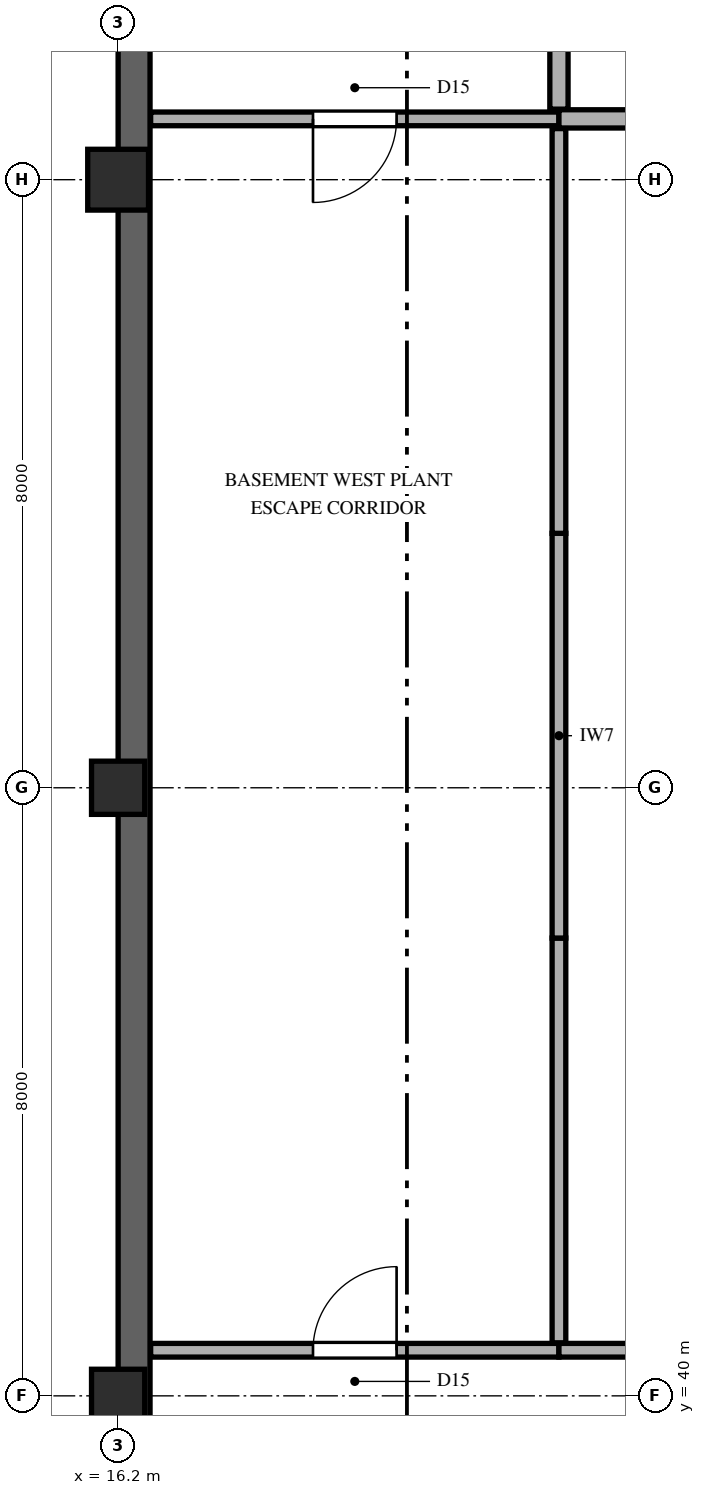
"""IFC4 building model, lengths in metres.
Left out: names, types, materials, properties, quantities, classifications, styles, units other than length and angle.
Written with IfcOpenShell. Run it as: python <this file> out.ifc"""

import sys

from ifc_helpers import new_model, si_unit, direction, frame, frame_2d, origin, origin_2d, place, context, subcontext, project, spatial, rectangle, extrude, element, fill, save


model = new_model("IFC4")
c1 = context("Model", 3, precision=1e-05, world=origin(), true_north=direction((0.0, 1.0)))
c2 = subcontext(c1, "Body", "Model", "MODEL_VIEW")
j1 = project(units=[si_unit("LENGTHUNIT", "METRE"), si_unit("PLANEANGLEUNIT", "RADIAN")], contexts=[c1])
p1 = place(None, origin())
s1 = spatial("IfcSite", under=j1, at=p1, CompositionType="ELEMENT")
p2 = place(p1, origin())
s2 = spatial("IfcBuilding", under=s1, at=p2, CompositionType="ELEMENT")
p3 = place(p2, frame((0.0, 0.0, -4.8)))
s3 = spatial("IfcBuildingStorey", under=s2, at=p3, CompositionType="ELEMENT", Elevation=-4.8)
p4 = place(p3, frame((16.41, 24.21, 0.0), z_axis=(0.0, 0.0, 1.0), x_axis=(0.0, 1.0, 0.0)))
e1 = element("IfcWall", 1, at=p4, inside=s3, PredefinedType="USERDEFINED", context=c2, shape_type="SweptSolid", body=[
    extrude(rectangle(XDim=87.58, YDim=0.42, at=frame_2d((43.79, 0.0))), origin(), (0.0, 0.0, 1.0), 4.45),
])
for number, where, z_axis, x_axis in (
    (2, (16.2, 40.0, 0.0), (0.0, 0.0, 1.0), (1.0, 0.0, 0.0)),
    (3, (16.2, 48.0, 0.0), (0.0, 0.0, 1.0), (1.0, 0.0, 0.0)),
):
    element("IfcColumn", number, at=place(p3, frame(where, z_axis=z_axis, x_axis=x_axis)), inside=s3, PredefinedType="COLUMN", context=c2, shape_type="SweptSolid", body=[
        extrude(rectangle(XDim=0.7, YDim=0.7, at=origin_2d()), origin(), (0.0, 0.0, 1.0), 4.8),
    ])
p5 = place(p3, frame((16.2, 56.0, 0.0), z_axis=(0.0, 0.0, 1.0), x_axis=(1.0, 0.0, 0.0)))
e4 = element("IfcColumn", 4, at=p5, inside=s3, PredefinedType="COLUMN", context=c2, shape_type="SweptSolid", body=[
    extrude(rectangle(XDim=0.8, YDim=0.8, at=origin_2d()), origin(), (0.0, 0.0, 1.0), 4.8),
])
p6 = place(p3, frame((16.628, 40.6, 0.0), z_axis=(0.0, 0.0, 1.0), x_axis=(1.0, 0.0, 0.0)))
e5 = element("IfcWall", 5, at=p6, inside=s3, PredefinedType="PARTITIONING", context=c2, shape_type="SweptSolid", body=[
    extrude(rectangle(XDim=5.372, YDim=0.18, at=frame_2d((2.686, 0.0))), origin(), (0.0, 0.0, 1.0), 4.45),
])
p7 = place(p6, frame((2.136, 0.0, 0.0)))
e6 = element("IfcOpeningElement", 6, at=p7, cuts=e5, PredefinedType="OPENING", context=c2, shape_type="SweptSolid", body=[
    extrude(rectangle(XDim=1.1, YDim=2.2, at=frame_2d((0.55, 1.1))), frame((0.0, 0.1, 0.0), z_axis=(0.0, -1.0, 0.0), x_axis=(1.0, 0.0, 0.0)), (0.0, 0.0, 1.0), 0.2),
])
p8 = place(p3, frame((16.628, 56.8, 0.0), z_axis=(0.0, 0.0, 1.0), x_axis=(1.0, 0.0, 0.0)))
e7 = element("IfcWall", 7, at=p8, inside=s3, PredefinedType="PARTITIONING", context=c2, shape_type="SweptSolid", body=[
    extrude(rectangle(XDim=5.372, YDim=0.18, at=frame_2d((2.686, 0.0))), origin(), (0.0, 0.0, 1.0), 4.45),
])
p9 = place(p8, frame((2.136, 0.0, 0.0)))
e8 = element("IfcOpeningElement", 8, at=p9, cuts=e7, PredefinedType="OPENING", context=c2, shape_type="SweptSolid", body=[
    extrude(rectangle(XDim=1.1, YDim=2.2, at=frame_2d((0.55, 1.1))), frame((0.0, 0.1, 0.0), z_axis=(0.0, -1.0, 0.0), x_axis=(1.0, 0.0, 0.0)), (0.0, 0.0, 1.0), 0.2),
])
p10 = place(p3, frame((22.0, 40.6, 0.0), z_axis=(0.0, 0.0, 1.0), x_axis=(1.0, 0.0, 0.0)))
e9 = element("IfcWall", 9, at=p10, inside=s3, PredefinedType="PARTITIONING", context=c2, shape_type="SweptSolid", body=[
    extrude(rectangle(XDim=6.667, YDim=0.18, at=frame_2d((3.333, 0.0))), origin(), (0.0, 0.0, 1.0), 4.45),
])
p11 = place(p3, frame((22.0, 56.8, 0.0), z_axis=(0.0, 0.0, 1.0), x_axis=(1.0, 0.0, 0.0)))
e10 = element("IfcWall", 10, at=p11, inside=s3, PredefinedType="PARTITIONING", context=c2, shape_type="SweptSolid", body=[
    extrude(rectangle(XDim=6.975, YDim=0.24, at=frame_2d((3.488, 0.0))), origin(), (0.0, 0.0, 1.0), 4.45),
])
p12 = place(p11, frame((4.003, 0.0, 0.0)))
e11 = element("IfcOpeningElement", 11, at=p12, cuts=e10, PredefinedType="OPENING", context=c2, shape_type="SweptSolid", body=[
    extrude(rectangle(XDim=1.2, YDim=2.3, at=frame_2d((0.6, 1.15))), frame((0.0, 0.13, 0.0), z_axis=(0.0, -1.0, 0.0), x_axis=(1.0, 0.0, 0.0)), (0.0, 0.0, 1.0), 0.26),
])
for number, where, z_axis, x_axis in (
    (12, (22.0, 40.698, 0.0), (0.0, 0.0, 1.0), (0.0, 1.0, 0.0)),
    (13, (22.0, 46.023, 0.0), (0.0, 0.0, 1.0), (0.0, 1.0, 0.0)),
    (14, (22.0, 51.347, 0.0), (0.0, 0.0, 1.0), (0.0, 1.0, 0.0)),
):
    element("IfcWall", number, at=place(p3, frame(where, z_axis=z_axis, x_axis=x_axis)), inside=s3, PredefinedType="PARTITIONING", context=c2, shape_type="SweptSolid", body=[
        extrude(rectangle(XDim=5.325, YDim=0.18, at=frame_2d((2.662, 0.0))), origin(), (0.0, 0.0, 1.0), 4.45),
    ])
p13 = place(p3, frame((22.0, 56.928, 0.0), z_axis=(0.0, 0.0, 1.0), x_axis=(0.0, 1.0, 0.0)))
e15 = element("IfcWall", 15, at=p13, inside=s3, PredefinedType="PARTITIONING", context=c2, shape_type="SweptSolid", body=[
    extrude(rectangle(XDim=3.164, YDim=0.24, at=frame_2d((1.582, 0.0))), origin(), (0.0, 0.0, 1.0), 4.45),
])
p14 = place(p13, frame((1.082, 0.0, 0.0)))
e16 = element("IfcOpeningElement", 16, at=p14, cuts=e15, PredefinedType="OPENING", context=c2, shape_type="SweptSolid", body=[
    extrude(rectangle(XDim=1.0, YDim=2.2, at=frame_2d((0.5, 1.1))), frame((0.0, 0.13, 0.0), z_axis=(0.0, -1.0, 0.0), x_axis=(1.0, 0.0, 0.0)), (0.0, 0.0, 1.0), 0.26),
])
p15 = place(p7, origin())
e17 = element("IfcDoor", 17, at=p15, inside=s3, OperationType="SINGLE_SWING_RIGHT", PredefinedType="DOOR", context=c2, shape_type="SweptSolid", body=[
    extrude(rectangle(XDim=1.1, YDim=2.2, at=frame_2d((0.55, 1.1))), frame((0.0, 0.025, 0.0), z_axis=(0.0, -1.0, 0.0), x_axis=(1.0, 0.0, 0.0)), (0.0, 0.0, 1.0), 0.05),
])
fill(e6, e17)
p16 = place(p9, frame((1.1, 0.0, 0.0), z_axis=(0.0, 0.0, 1.0), x_axis=(-1.0, 0.0, 0.0)))
e18 = element("IfcDoor", 18, at=p16, inside=s3, OperationType="SINGLE_SWING_LEFT", PredefinedType="DOOR", context=c2, shape_type="SweptSolid", body=[
    extrude(rectangle(XDim=1.1, YDim=2.2, at=frame_2d((0.55, 1.1))), frame((0.0, 0.025, 0.0), z_axis=(0.0, -1.0, 0.0), x_axis=(1.0, 0.0, 0.0)), (0.0, 0.0, 1.0), 0.05),
])
fill(e8, e18)
save(model, sys.argv[1])
